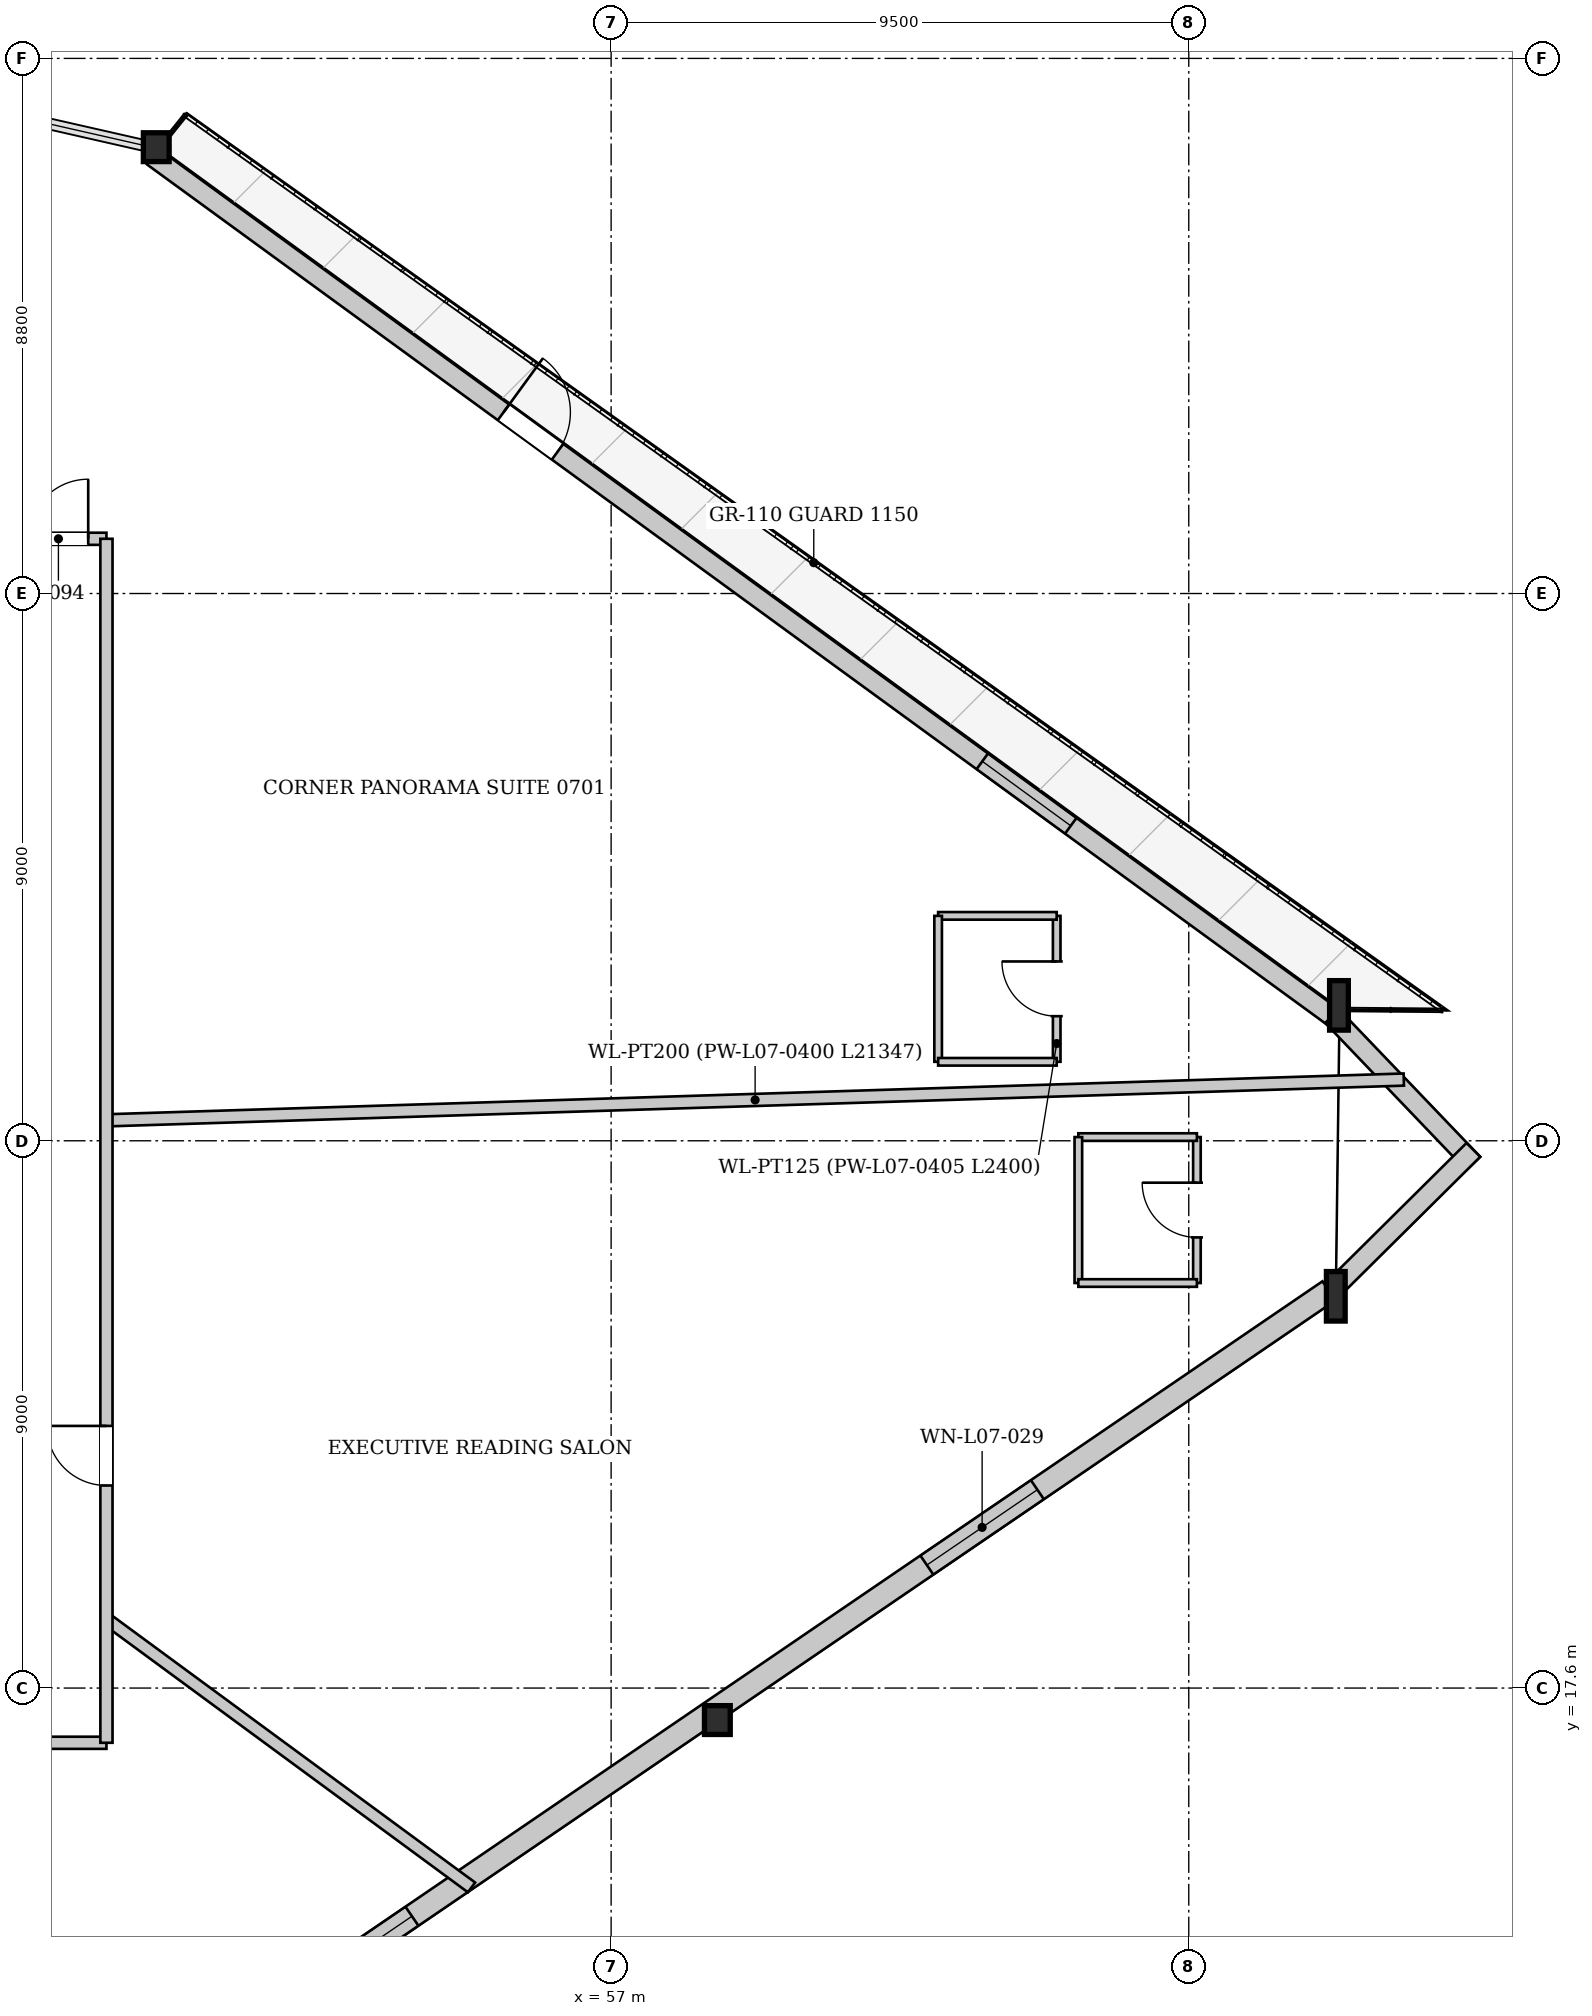
"""IFC4 building model, lengths in metres.
Left out: names, types, materials, properties, quantities, classifications, styles, units other than length and angle.
Written with IfcOpenShell. Run it as: python <this file> out.ifc"""

import sys

from ifc_helpers import new_model, si_unit, direction, frame, frame_2d, origin, origin_2d, place, context, subcontext, project, spatial, rectangle, i_section, extrude, source, transform, mapped, element, fill, save


model = new_model("IFC4")
c1 = context("Model", 3, precision=1e-05, world=origin(), true_north=direction((0.0, 1.0)))
c2 = subcontext(c1, "Body", "Model", "MODEL_VIEW")
j1 = project(units=[si_unit("LENGTHUNIT", "METRE"), si_unit("PLANEANGLEUNIT", "RADIAN")], contexts=[c1])
p1 = place(None, origin())
s1 = spatial("IfcSite", under=j1, at=p1, CompositionType="ELEMENT")
p2 = place(p1, origin())
s2 = spatial("IfcBuilding", under=s1, at=p2, CompositionType="ELEMENT")
p3 = place(p2, frame((0.0, 0.0, 32.85)))
s3 = spatial("IfcBuildingStorey", under=s2, at=p3, CompositionType="ELEMENT", Elevation=32.85)
m1 = source(origin(), c2, "Body", "SweptSolid", [
    extrude(i_section(OverallWidth=0.308, OverallDepth=0.814, WebThickness=0.021, FlangeThickness=0.04, at=origin_2d()), origin(), (0.0, 0.0, 1.0), 3.388),
])
for number, where, z_axis, x_axis in (
    (1, (68.913, 23.975, 0.0), (0.003, 0.04, 0.999), (-0.997, 0.081, 0.0)),
    (2, (68.975, 28.759, 0.0), (-0.003, 0.04, 0.999), (-0.997, -0.072, 0.0)),
):
    element("IfcColumn", number, at=place(p3, frame(where, z_axis=z_axis, x_axis=x_axis)), inside=s3, PredefinedType="COLUMN", context=c2, shape_type="MappedRepresentation", body=[
        mapped(m1, transform((0.0, 0.0, 0.0), x_axis=(1.0, 0.0, 0.0), y_axis=(0.0, 1.0, 0.0), z_axis=(0.0, 0.0, 1.0), scale=1.0)),
    ])
m2 = source(origin(), c2, "Body", "SweptSolid", [
    extrude(i_section(OverallWidth=0.424, OverallDepth=0.474, WebThickness=0.043, FlangeThickness=0.068, at=origin_2d()), origin(), (0.0, 0.0, 1.0), 3.386),
])
p4 = place(p3, frame((49.555, 42.915, 0.0), z_axis=(-0.021053232125, 0.014852622664, 0.999668025405), x_axis=(-0.576463443595, -0.817122939464, 0.0)))
e3 = element("IfcColumn", 3, at=p4, inside=s3, PredefinedType="COLUMN", context=c2, shape_type="MappedRepresentation", body=[
    mapped(m2, transform((0.0, 0.0, 0.0), x_axis=(1.0, 0.0, 0.0), y_axis=(0.0, 1.0, 0.0), z_axis=(0.0, 0.0, 1.0), scale=1.0)),
])
m3 = source(origin(), c2, "Body", "SweptSolid", [
    extrude(i_section(OverallWidth=0.424, OverallDepth=0.474, WebThickness=0.043, FlangeThickness=0.068, at=origin_2d()), origin(), (0.0, 0.0, 1.0), 3.386),
])
p5 = place(p3, frame((58.726, 17.029, 0.0), z_axis=(0.012255781471, 0.026746440739, 0.999567118171), x_axis=(-0.909103491218, 0.416570332903, 0.0)))
e4 = element("IfcColumn", 4, at=p5, inside=s3, PredefinedType="COLUMN", context=c2, shape_type="MappedRepresentation", body=[
    mapped(m3, transform((0.0, 0.0, 0.0), x_axis=(1.0, 0.0, 0.0), y_axis=(0.0, 1.0, 0.0), z_axis=(0.0, 0.0, 1.0), scale=1.0)),
])
p6 = place(p3, frame((49.46, 42.786, 0.0), z_axis=(0.0, 0.0, 1.0), x_axis=(0.808105654282, -0.589037563757, 0.0)))
e5 = element("IfcWall", 5, at=p6, inside=s3, PredefinedType="SOLIDWALL", context=c2, shape_type="SweptSolid", body=[
    extrude(rectangle(XDim=24.032, YDim=0.32, at=frame_2d((12.016, 0.0))), origin(), (0.0, 0.0, 1.0), 2.592),
])
p7 = place(p6, frame((7.14, 0.0, 0.0)))
e6 = element("IfcOpeningElement", 6, at=p7, cuts=e5, PredefinedType="OPENING", context=c2, shape_type="SweptSolid", body=[
    extrude(rectangle(XDim=1.1, YDim=2.3, at=frame_2d((0.55, 1.15))), frame((0.0, 0.17, 0.0), z_axis=(0.0, -1.0, 0.0), x_axis=(1.0, 0.0, 0.0)), (0.0, 0.0, 1.0), 0.34),
])
p8 = place(p6, frame((16.884, 0.0, 0.272)))
e7 = element("IfcOpeningElement", 7, at=p8, cuts=e5, PredefinedType="OPENING", context=c2, shape_type="SweptSolid", body=[
    extrude(rectangle(XDim=1.8, YDim=2.2, at=frame_2d((0.9, 1.1))), frame((0.0, 0.17, 0.0), z_axis=(0.0, -1.0, 0.0), x_axis=(1.0, 0.0, 0.0)), (0.0, 0.0, 1.0), 0.34),
])
for number, where, z_axis, x_axis in (
    (8, (68.859, 28.649, 0.0), (0.0, 0.0, 1.0), (0.691, -0.722, 0.0)),
    (9, (71.181, 26.45, 0.0), (0.0, 0.0, 1.0), (-0.71, -0.704, 0.0)),
):
    element("IfcWall", number, at=place(p3, frame(where, z_axis=z_axis, x_axis=x_axis)), inside=s3, PredefinedType="SOLIDWALL", context=c2, shape_type="SweptSolid", body=[
        extrude(rectangle(XDim=3.354, YDim=0.32, at=frame_2d((1.677, 0.0))), origin(), (0.0, 0.0, 1.0), 2.592),
    ])
p9 = place(p3, frame((68.805, 24.132, 0.0), z_axis=(0.0, 0.0, 1.0), x_axis=(-0.826173505972, -0.563415777229, 0.0)))
e10 = element("IfcWall", 10, at=p9, inside=s3, PredefinedType="SOLIDWALL", context=c2, shape_type="SweptSolid", body=[
    extrude(rectangle(XDim=24.659, YDim=0.38, at=frame_2d((12.329, 0.0))), origin(), (0.0, 0.0, 1.0), 2.592),
])
p10 = place(p9, frame((5.804, 0.0, 0.222)))
e11 = element("IfcOpeningElement", 11, at=p10, cuts=e10, PredefinedType="OPENING", context=c2, shape_type="SweptSolid", body=[
    extrude(rectangle(XDim=2.2, YDim=2.25, at=frame_2d((1.1, 1.125))), frame((0.0, 0.2, 0.0), z_axis=(0.0, -1.0, 0.0), x_axis=(1.0, 0.0, 0.0)), (0.0, 0.0, 1.0), 0.4),
])
p11 = place(p9, frame((18.254, 0.0, 0.222)))
e12 = element("IfcOpeningElement", 12, at=p11, cuts=e10, PredefinedType="OPENING", context=c2, shape_type="SweptSolid", body=[
    extrude(rectangle(XDim=2.2, YDim=2.25, at=frame_2d((1.1, 1.125))), frame((0.0, 0.2, 0.0), z_axis=(0.0, -1.0, 0.0), x_axis=(1.0, 0.0, 0.0)), (0.0, 0.0, 1.0), 0.4),
])
p12 = place(p3, frame((48.7, 26.936, 0.0), z_axis=(0.0, 0.0, 1.0), x_axis=(0.999506728067, 0.031405422286, 0.0)))
e13 = element("IfcWall", 13, at=p12, inside=s3, PredefinedType="PARTITIONING", context=c2, shape_type="SweptSolid", body=[
    extrude(rectangle(XDim=21.347, YDim=0.2, at=frame_2d((10.673, 0.0))), origin(), (0.0, 0.0, 1.0), 3.3),
])
p13 = place(p3, frame((48.7, 18.735, 0.0), z_axis=(0.0, 0.0, 1.0), x_axis=(0.805734708508, -0.592276607258, 0.0)))
e14 = element("IfcWall", 14, at=p13, inside=s3, PredefinedType="PARTITIONING", context=c2, shape_type="SweptSolid", body=[
    extrude(rectangle(XDim=7.451, YDim=0.2, at=frame_2d((3.726, 0.0))), origin(), (0.0, 0.0, 1.0), 3.3),
])
p14 = place(p3, frame((64.328, 27.899, 0.0), z_axis=(0.0, 0.0, 1.0), x_axis=(0.0, 1.0, 0.0)))
e15 = element("IfcWall", 15, at=p14, inside=s3, PredefinedType="PARTITIONING", context=c2, shape_type="SweptSolid", body=[
    extrude(rectangle(XDim=2.4, YDim=0.125, at=frame_2d((1.2, 0.0))), origin(), (0.0, 0.0, 1.0), 3.3),
])
p15 = place(p14, frame((0.75, 0.0, 0.0)))
e16 = element("IfcOpeningElement", 16, at=p15, cuts=e15, PredefinedType="OPENING", context=c2, shape_type="SweptSolid", body=[
    extrude(rectangle(XDim=0.9, YDim=2.1, at=frame_2d((0.45, 1.05))), frame((0.0, 0.073, 0.0), z_axis=(0.0, -1.0, 0.0), x_axis=(1.0, 0.0, 0.0)), (0.0, 0.0, 1.0), 0.145),
])
p16 = place(p3, frame((64.328, 30.299, 0.0), z_axis=(0.0, 0.0, 1.0), x_axis=(-1.0, 0.0, 0.0)))
e17 = element("IfcWall", 17, at=p16, inside=s3, PredefinedType="PARTITIONING", context=c2, shape_type="SweptSolid", body=[
    extrude(rectangle(XDim=1.95, YDim=0.125, at=frame_2d((0.975, 0.0))), origin(), (0.0, 0.0, 1.0), 3.3),
])
p17 = place(p3, frame((62.378, 30.299, 0.0), z_axis=(0.0, 0.0, 1.0), x_axis=(0.0, -1.0, 0.0)))
e18 = element("IfcWall", 18, at=p17, inside=s3, PredefinedType="PARTITIONING", context=c2, shape_type="SweptSolid", body=[
    extrude(rectangle(XDim=2.4, YDim=0.125, at=frame_2d((1.2, 0.0))), origin(), (0.0, 0.0, 1.0), 3.3),
])
p18 = place(p3, frame((62.378, 27.899, 0.0), z_axis=(0.0, 0.0, 1.0), x_axis=(1.0, 0.0, 0.0)))
e19 = element("IfcWall", 19, at=p18, inside=s3, PredefinedType="PARTITIONING", context=c2, shape_type="SweptSolid", body=[
    extrude(rectangle(XDim=1.95, YDim=0.125, at=frame_2d((0.975, 0.0))), origin(), (0.0, 0.0, 1.0), 3.3),
])
p19 = place(p3, frame((66.634, 24.261, 0.0), z_axis=(0.0, 0.0, 1.0), x_axis=(0.0, 1.0, 0.0)))
e20 = element("IfcWall", 20, at=p19, inside=s3, PredefinedType="PARTITIONING", context=c2, shape_type="SweptSolid", body=[
    extrude(rectangle(XDim=2.4, YDim=0.125, at=frame_2d((1.2, 0.0))), origin(), (0.0, 0.0, 1.0), 3.3),
])
p20 = place(p19, frame((0.75, 0.0, 0.0)))
e21 = element("IfcOpeningElement", 21, at=p20, cuts=e20, PredefinedType="OPENING", context=c2, shape_type="SweptSolid", body=[
    extrude(rectangle(XDim=0.9, YDim=2.1, at=frame_2d((0.45, 1.05))), frame((0.0, 0.073, 0.0), z_axis=(0.0, -1.0, 0.0), x_axis=(1.0, 0.0, 0.0)), (0.0, 0.0, 1.0), 0.145),
])
p21 = place(p3, frame((66.634, 26.661, 0.0), z_axis=(0.0, 0.0, 1.0), x_axis=(-1.0, 0.0, 0.0)))
e22 = element("IfcWall", 22, at=p21, inside=s3, PredefinedType="PARTITIONING", context=c2, shape_type="SweptSolid", body=[
    extrude(rectangle(XDim=1.95, YDim=0.125, at=frame_2d((0.975, 0.0))), origin(), (0.0, 0.0, 1.0), 2.795),
])
p22 = place(p3, frame((64.684, 26.661, 0.0), z_axis=(0.0, 0.0, 1.0), x_axis=(0.0, -1.0, 0.0)))
e23 = element("IfcWall", 23, at=p22, inside=s3, PredefinedType="PARTITIONING", context=c2, shape_type="SweptSolid", body=[
    extrude(rectangle(XDim=2.4, YDim=0.125, at=frame_2d((1.2, 0.0))), origin(), (0.0, 0.0, 1.0), 3.3),
])
p23 = place(p3, frame((64.684, 24.261, 0.0), z_axis=(0.0, 0.0, 1.0), x_axis=(1.0, 0.0, 0.0)))
e24 = element("IfcWall", 24, at=p23, inside=s3, PredefinedType="PARTITIONING", context=c2, shape_type="SweptSolid", body=[
    extrude(rectangle(XDim=1.95, YDim=0.125, at=frame_2d((0.975, 0.0))), origin(), (0.0, 0.0, 1.0), 3.3),
])
p24 = place(p3, frame((27.3, 16.7, 0.0), z_axis=(0.0, 0.0, 1.0), x_axis=(1.0, 0.0, 0.0)))
e25 = element("IfcWall", 25, at=p24, inside=s3, PredefinedType="PARTITIONING", context=c2, shape_type="SweptSolid", body=[
    extrude(rectangle(XDim=21.4, YDim=0.2, at=frame_2d((10.7, 0.0))), origin(), (0.0, 0.0, 1.0), 3.3),
])
p25 = place(p24, frame((9.078, 0.0, 0.0)))
e26 = element("IfcOpeningElement", 26, at=p25, cuts=e25, PredefinedType="OPENING", context=c2, shape_type="SweptSolid", body=[
    extrude(rectangle(XDim=0.98, YDim=2.15, at=frame_2d((0.49, 1.075))), frame((0.0, 0.11, 0.0), z_axis=(0.0, -1.0, 0.0), x_axis=(1.0, 0.0, 0.0)), (0.0, 0.0, 1.0), 0.22),
])
p26 = place(p3, frame((27.3, 36.5, 0.0), z_axis=(0.0, 0.0, 1.0), x_axis=(1.0, 0.0, 0.0)))
e27 = element("IfcWall", 27, at=p26, inside=s3, PredefinedType="PARTITIONING", context=c2, shape_type="SweptSolid", body=[
    extrude(rectangle(XDim=21.4, YDim=0.2, at=frame_2d((10.7, 0.0))), origin(), (0.0, 0.0, 1.0), 3.3),
])
p27 = place(p26, frame((20.12, 0.0, 0.0)))
e28 = element("IfcOpeningElement", 28, at=p27, cuts=e27, PredefinedType="OPENING", context=c2, shape_type="SweptSolid", body=[
    extrude(rectangle(XDim=0.98, YDim=2.15, at=frame_2d((0.49, 1.075))), frame((0.0, 0.11, 0.0), z_axis=(0.0, -1.0, 0.0), x_axis=(1.0, 0.0, 0.0)), (0.0, 0.0, 1.0), 0.22),
])
p28 = place(p3, frame((48.7, 16.7, 0.0), z_axis=(0.0, 0.0, 1.0), x_axis=(0.0, 1.0, 0.0)))
e29 = element("IfcWall", 29, at=p28, inside=s3, PredefinedType="PARTITIONING", context=c2, shape_type="SweptSolid", body=[
    extrude(rectangle(XDim=19.8, YDim=0.2, at=frame_2d((9.9, 0.0))), origin(), (0.0, 0.0, 1.0), 3.3),
])
p29 = place(p28, frame((4.231, 0.0, 0.0)))
e30 = element("IfcOpeningElement", 30, at=p29, cuts=e29, PredefinedType="OPENING", context=c2, shape_type="SweptSolid", body=[
    extrude(rectangle(XDim=0.98, YDim=2.15, at=frame_2d((0.49, 1.075))), frame((0.0, 0.11, 0.0), z_axis=(0.0, -1.0, 0.0), x_axis=(1.0, 0.0, 0.0)), (0.0, 0.0, 1.0), 0.22),
])
m4 = source(origin(), c2, "Body", "SweptSolid", [
    extrude(rectangle(XDim=1.1, YDim=2.3, at=frame_2d((0.55, 1.15))), frame((0.0, 0.025, 0.0), z_axis=(0.0, -1.0, 0.0), x_axis=(1.0, 0.0, 0.0)), (0.0, 0.0, 1.0), 0.05),
])
p30 = place(p7, origin())
e31 = element("IfcDoor", 31, at=p30, inside=s3, OperationType="SINGLE_SWING_LEFT", PredefinedType="DOOR", context=c2, shape_type="MappedRepresentation", body=[
    mapped(m4, transform((0.0, 0.0, 0.0), x_axis=(1.0, 0.0, 0.0), y_axis=(0.0, 1.0, 0.0), z_axis=(0.0, 0.0, 1.0), scale=1.0)),
])
fill(e6, e31)
m5 = source(origin(), c2, "Body", "SweptSolid", [
    extrude(rectangle(XDim=1.8, YDim=2.2, at=frame_2d((0.9, 1.1))), frame((0.0, 0.03, 0.0), z_axis=(0.0, -1.0, 0.0), x_axis=(1.0, 0.0, 0.0)), (0.0, 0.0, 1.0), 0.06),
])
p31 = place(p8, origin())
e32 = element("IfcWindow", 32, at=p31, inside=s3, PartitioningType="SINGLE_PANEL", PredefinedType="WINDOW", context=c2, shape_type="MappedRepresentation", body=[
    mapped(m5, transform((0.0, 0.0, 0.0), x_axis=(1.0, 0.0, 0.0), y_axis=(0.0, 1.0, 0.0), z_axis=(0.0, 0.0, 1.0), scale=1.0)),
])
fill(e7, e32)
m6 = source(origin(), c2, "Body", "SweptSolid", [
    extrude(rectangle(XDim=2.2, YDim=2.25, at=frame_2d((1.1, 1.125))), frame((0.0, 0.03, 0.0), z_axis=(0.0, -1.0, 0.0), x_axis=(1.0, 0.0, 0.0)), (0.0, 0.0, 1.0), 0.06),
])
p32 = place(p10, origin())
e33 = element("IfcWindow", 33, at=p32, inside=s3, PartitioningType="SINGLE_PANEL", PredefinedType="WINDOW", context=c2, shape_type="MappedRepresentation", body=[
    mapped(m6, transform((0.0, 0.0, 0.0), x_axis=(1.0, 0.0, 0.0), y_axis=(0.0, 1.0, 0.0), z_axis=(0.0, 0.0, 1.0), scale=1.0)),
])
fill(e11, e33)
p33 = place(p11, origin())
e34 = element("IfcWindow", 34, at=p33, inside=s3, PartitioningType="SINGLE_PANEL", PredefinedType="WINDOW", context=c2, shape_type="MappedRepresentation", body=[
    mapped(m6, transform((0.0, 0.0, 0.0), x_axis=(1.0, 0.0, 0.0), y_axis=(0.0, 1.0, 0.0), z_axis=(0.0, 0.0, 1.0), scale=1.0)),
])
fill(e12, e34)
m7 = source(origin(), c2, "Body", "SweptSolid", [
    extrude(rectangle(XDim=0.9, YDim=2.1, at=frame_2d((0.45, 1.05))), frame((0.0, 0.025, 0.0), z_axis=(0.0, -1.0, 0.0), x_axis=(1.0, 0.0, 0.0)), (0.0, 0.0, 1.0), 0.05),
])
p34 = place(p15, origin())
e35 = element("IfcDoor", 35, at=p34, inside=s3, OperationType="SINGLE_SWING_RIGHT", PredefinedType="DOOR", context=c2, shape_type="MappedRepresentation", body=[
    mapped(m7, transform((0.0, 0.0, 0.0), x_axis=(1.0, 0.0, 0.0), y_axis=(0.0, 1.0, 0.0), z_axis=(0.0, 0.0, 1.0), scale=1.0)),
])
fill(e16, e35)
p35 = place(p20, origin())
e36 = element("IfcDoor", 36, at=p35, inside=s3, OperationType="SINGLE_SWING_RIGHT", PredefinedType="DOOR", context=c2, shape_type="MappedRepresentation", body=[
    mapped(m7, transform((0.0, 0.0, 0.0), x_axis=(1.0, 0.0, 0.0), y_axis=(0.0, 1.0, 0.0), z_axis=(0.0, 0.0, 1.0), scale=1.0)),
])
fill(e21, e36)
m8 = source(origin(), c2, "Body", "SweptSolid", [
    extrude(rectangle(XDim=0.98, YDim=2.15, at=frame_2d((0.49, 1.075))), frame((0.0, 0.025, 0.0), z_axis=(0.0, -1.0, 0.0), x_axis=(1.0, 0.0, 0.0)), (0.0, 0.0, 1.0), 0.05),
])
p36 = place(p27, origin())
e37 = element("IfcDoor", 37, at=p36, inside=s3, OperationType="SINGLE_SWING_RIGHT", PredefinedType="DOOR", context=c2, shape_type="MappedRepresentation", body=[
    mapped(m8, transform((0.0, 0.0, 0.0), x_axis=(1.0, 0.0, 0.0), y_axis=(0.0, 1.0, 0.0), z_axis=(0.0, 0.0, 1.0), scale=1.0)),
])
fill(e28, e37)
p37 = place(p29, origin())
e38 = element("IfcDoor", 38, at=p37, inside=s3, OperationType="SINGLE_SWING_RIGHT", PredefinedType="DOOR", context=c2, shape_type="MappedRepresentation", body=[
    mapped(m8, transform((0.0, 0.0, 0.0), x_axis=(1.0, 0.0, 0.0), y_axis=(0.0, 1.0, 0.0), z_axis=(0.0, 0.0, 1.0), scale=1.0)),
])
fill(e30, e38)
save(model, sys.argv[1])
